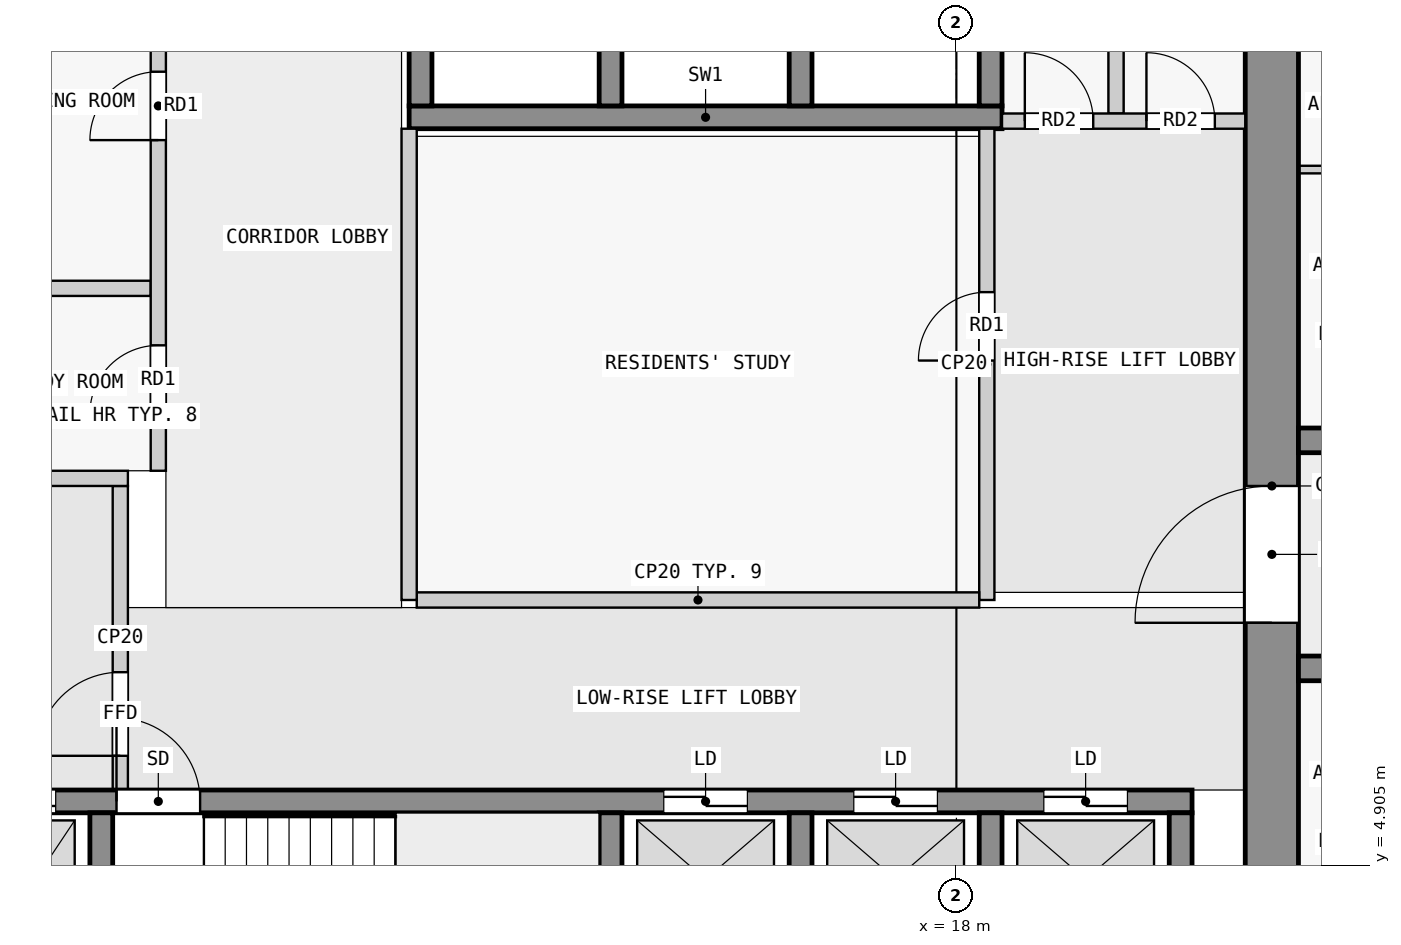
"""IFC4 building model, lengths in metres.
Left out: names, types, materials, properties, quantities, classifications, styles, units other than length and angle.
Written with IfcOpenShell. Run it as: python <this file> out.ifc"""

import sys

from ifc_helpers import new_model, si_unit, direction, frame, frame_2d, origin, place, context, subcontext, project, spatial, rectangle, extrude, element, fill, save


model = new_model("IFC4")
c1 = context("Model", 3, precision=1e-05, world=origin(), true_north=direction((0.0, 1.0)))
c2 = subcontext(c1, "Body", "Model", "MODEL_VIEW")
j1 = project(units=[si_unit("LENGTHUNIT", "METRE"), si_unit("PLANEANGLEUNIT", "RADIAN")], contexts=[c1])
p1 = place(None, origin())
s1 = spatial("IfcSite", under=j1, at=p1, CompositionType="ELEMENT")
p2 = place(p1, origin())
s2 = spatial("IfcBuilding", under=s1, at=p2, CompositionType="ELEMENT")
p3 = place(p2, frame((0.0, 0.0, 78.3)))
s3 = spatial("IfcBuildingStorey", under=s2, at=p3, CompositionType="ELEMENT", Elevation=78.3)
p4 = place(p3, frame((22.15, 2.5, 0.0), z_axis=(0.0, 0.0, 1.0), x_axis=(0.0, 1.0, 0.0)))
e1 = element("IfcWall", 1, at=p4, inside=s3, PredefinedType="SHEAR", context=c2, shape_type="SweptSolid", body=[
    extrude(rectangle(XDim=14.8, YDim=0.7, at=frame_2d((7.4, 0.0))), origin(), (0.0, 0.0, 1.0), 3.25),
])
p5 = place(p4, frame((5.6, 0.0, 0.0)))
e2 = element("IfcOpeningElement", 2, at=p5, cuts=e1, PredefinedType="OPENING", context=c2, shape_type="SweptSolid", body=[
    extrude(rectangle(XDim=1.8, YDim=2.1, at=frame_2d((0.9, 1.05))), frame((0.0, 0.36, 0.0), z_axis=(0.0, -1.0, 0.0), x_axis=(1.0, 0.0, 0.0)), (0.0, 0.0, 1.0), 0.72),
])
for number, where, z_axis, x_axis in (
    (3, (6.75, 2.8, 0.0), (0.0, 0.0, 1.0), (0.0, 1.0, 0.0)),
    (4, (13.45, 2.8, 0.0), (0.0, 0.0, 1.0), (0.0, 1.0, 0.0)),
    (5, (15.95, 2.8, 0.0), (0.0, 0.0, 1.0), (0.0, 1.0, 0.0)),
    (6, (18.45, 2.8, 0.0), (0.0, 0.0, 1.0), (0.0, 1.0, 0.0)),
    (7, (20.95, 2.8, 0.0), (0.0, 0.0, 1.0), (0.0, 1.0, 0.0)),
):
    element("IfcWall", number, at=place(p3, frame(where, z_axis=z_axis, x_axis=x_axis)), inside=s3, PredefinedType="SHEAR", context=c2, shape_type="SweptSolid", body=[
        extrude(rectangle(XDim=2.8, YDim=0.3, at=frame_2d((1.4, 0.0))), origin(), (0.0, 0.0, 1.0), 3.25),
    ])
p6 = place(p3, frame((2.3, 5.75, 0.0), z_axis=(0.0, 0.0, 1.0), x_axis=(1.0, 0.0, 0.0)))
e8 = element("IfcWall", 8, at=p6, inside=s3, PredefinedType="SHEAR", context=c2, shape_type="SweptSolid", body=[
    extrude(rectangle(XDim=18.8, YDim=0.3, at=frame_2d((9.4, 0.0))), origin(), (0.0, 0.0, 1.0), 3.25),
])
p7 = place(p6, frame((4.65, 0.0, 0.0)))
e9 = element("IfcOpeningElement", 9, at=p7, cuts=e8, PredefinedType="OPENING", context=c2, shape_type="SweptSolid", body=[
    extrude(rectangle(XDim=1.1, YDim=2.1, at=frame_2d((0.55, 1.05))), frame((0.0, 0.16, 0.0), z_axis=(0.0, -1.0, 0.0), x_axis=(1.0, 0.0, 0.0)), (0.0, 0.0, 1.0), 0.32),
])
p8 = place(p6, frame((0.45, 0.0, 0.0)))
e10 = element("IfcOpeningElement", 10, at=p8, cuts=e8, PredefinedType="OPENING", context=c2, shape_type="SweptSolid", body=[
    extrude(rectangle(XDim=1.1, YDim=2.1, at=frame_2d((0.55, 1.05))), frame((0.0, 0.16, 0.0), z_axis=(0.0, -1.0, 0.0), x_axis=(1.0, 0.0, 0.0)), (0.0, 0.0, 1.0), 0.32),
])
p9 = place(p6, frame((2.75, 0.0, 0.0)))
e11 = element("IfcOpeningElement", 11, at=p9, cuts=e8, PredefinedType="OPENING", context=c2, shape_type="SweptSolid", body=[
    extrude(rectangle(XDim=1.1, YDim=2.1, at=frame_2d((0.55, 1.05))), frame((0.0, 0.16, 0.0), z_axis=(0.0, -1.0, 0.0), x_axis=(1.0, 0.0, 0.0)), (0.0, 0.0, 1.0), 0.32),
])
p10 = place(p6, frame((11.85, 0.0, 0.0)))
e12 = element("IfcOpeningElement", 12, at=p10, cuts=e8, PredefinedType="OPENING", context=c2, shape_type="SweptSolid", body=[
    extrude(rectangle(XDim=1.1, YDim=2.1, at=frame_2d((0.55, 1.05))), frame((0.0, 0.16, 0.0), z_axis=(0.0, -1.0, 0.0), x_axis=(1.0, 0.0, 0.0)), (0.0, 0.0, 1.0), 0.32),
])
p11 = place(p6, frame((14.35, 0.0, 0.0)))
e13 = element("IfcOpeningElement", 13, at=p11, cuts=e8, PredefinedType="OPENING", context=c2, shape_type="SweptSolid", body=[
    extrude(rectangle(XDim=1.1, YDim=2.1, at=frame_2d((0.55, 1.05))), frame((0.0, 0.16, 0.0), z_axis=(0.0, -1.0, 0.0), x_axis=(1.0, 0.0, 0.0)), (0.0, 0.0, 1.0), 0.32),
])
p12 = place(p6, frame((16.85, 0.0, 0.0)))
e14 = element("IfcOpeningElement", 14, at=p12, cuts=e8, PredefinedType="OPENING", context=c2, shape_type="SweptSolid", body=[
    extrude(rectangle(XDim=1.1, YDim=2.1, at=frame_2d((0.55, 1.05))), frame((0.0, 0.16, 0.0), z_axis=(0.0, -1.0, 0.0), x_axis=(1.0, 0.0, 0.0)), (0.0, 0.0, 1.0), 0.32),
])
p13 = place(p3, frame((10.8, 14.75, 0.0), z_axis=(0.0, 0.0, 1.0), x_axis=(1.0, 0.0, 0.0)))
e15 = element("IfcWall", 15, at=p13, inside=s3, PredefinedType="SHEAR", context=c2, shape_type="SweptSolid", body=[
    extrude(rectangle(XDim=7.8, YDim=0.3, at=frame_2d((3.9, 0.0))), origin(), (0.0, 0.0, 1.0), 3.25),
])
for number, where, z_axis, x_axis in (
    (16, (10.95, 14.9, 0.0), (0.0, 0.0, 1.0), (0.0, 1.0, 0.0)),
    (17, (13.45, 14.9, 0.0), (0.0, 0.0, 1.0), (0.0, 1.0, 0.0)),
    (18, (15.95, 14.9, 0.0), (0.0, 0.0, 1.0), (0.0, 1.0, 0.0)),
    (19, (18.45, 14.9, 0.0), (0.0, 0.0, 1.0), (0.0, 1.0, 0.0)),
):
    element("IfcWall", number, at=place(p3, frame(where, z_axis=z_axis, x_axis=x_axis)), inside=s3, PredefinedType="SHEAR", context=c2, shape_type="SweptSolid", body=[
        extrude(rectangle(XDim=2.0, YDim=0.3, at=frame_2d((1.0, 0.0))), origin(), (0.0, 0.0, 1.0), 3.25),
    ])
p14 = place(p3, frame((22.5, 7.5, 0.0), z_axis=(0.0, 0.0, 1.0), x_axis=(1.0, 0.0, 0.0)))
e20 = element("IfcWall", 20, at=p14, inside=s3, PredefinedType="SHEAR", context=c2, shape_type="SweptSolid", body=[
    extrude(rectangle(XDim=22.5, YDim=0.325, at=frame_2d((11.25, 0.0))), origin(), (0.0, 0.0, 1.0), 3.25),
])
p15 = place(p14, frame((4.05, 0.0, 0.0)))
e21 = element("IfcOpeningElement", 21, at=p15, cuts=e20, PredefinedType="OPENING", context=c2, shape_type="SweptSolid", body=[
    extrude(rectangle(XDim=1.0, YDim=2.1, at=frame_2d((0.5, 1.05))), frame((0.0, 0.172, 0.0), z_axis=(0.0, -1.0, 0.0), x_axis=(1.0, 0.0, 0.0)), (0.0, 0.0, 1.0), 0.345),
])
p16 = place(p14, frame((13.05, 0.0, 0.0)))
e22 = element("IfcOpeningElement", 22, at=p16, cuts=e20, PredefinedType="OPENING", context=c2, shape_type="SweptSolid", body=[
    extrude(rectangle(XDim=1.0, YDim=2.1, at=frame_2d((0.5, 1.05))), frame((0.0, 0.172, 0.0), z_axis=(0.0, -1.0, 0.0), x_axis=(1.0, 0.0, 0.0)), (0.0, 0.0, 1.0), 0.345),
])
p17 = place(p14, frame((18.75, 0.0, 0.0)))
e23 = element("IfcOpeningElement", 23, at=p17, cuts=e20, PredefinedType="OPENING", context=c2, shape_type="SweptSolid", body=[
    extrude(rectangle(XDim=0.9, YDim=2.1, at=frame_2d((0.45, 1.05))), frame((0.0, 0.172, 0.0), z_axis=(0.0, -1.0, 0.0), x_axis=(1.0, 0.0, 0.0)), (0.0, 0.0, 1.0), 0.345),
])
p18 = place(p14, frame((20.95, 0.0, 0.0)))
e24 = element("IfcOpeningElement", 24, at=p18, cuts=e20, PredefinedType="OPENING", context=c2, shape_type="SweptSolid", body=[
    extrude(rectangle(XDim=1.0, YDim=2.1, at=frame_2d((0.5, 1.05))), frame((0.0, 0.172, 0.0), z_axis=(0.0, -1.0, 0.0), x_axis=(1.0, 0.0, 0.0)), (0.0, 0.0, 1.0), 0.345),
])
p19 = place(p3, frame((22.5, 10.5, 0.0), z_axis=(0.0, 0.0, 1.0), x_axis=(1.0, 0.0, 0.0)))
e25 = element("IfcWall", 25, at=p19, inside=s3, PredefinedType="SHEAR", context=c2, shape_type="SweptSolid", body=[
    extrude(rectangle(XDim=22.5, YDim=0.325, at=frame_2d((11.25, 0.0))), origin(), (0.0, 0.0, 1.0), 3.25),
])
p20 = place(p19, frame((4.05, 0.0, 0.0)))
e26 = element("IfcOpeningElement", 26, at=p20, cuts=e25, PredefinedType="OPENING", context=c2, shape_type="SweptSolid", body=[
    extrude(rectangle(XDim=1.0, YDim=2.1, at=frame_2d((0.5, 1.05))), frame((0.0, 0.172, 0.0), z_axis=(0.0, -1.0, 0.0), x_axis=(1.0, 0.0, 0.0)), (0.0, 0.0, 1.0), 0.345),
])
p21 = place(p19, frame((10.75, 0.0, 0.0)))
e27 = element("IfcOpeningElement", 27, at=p21, cuts=e25, PredefinedType="OPENING", context=c2, shape_type="SweptSolid", body=[
    extrude(rectangle(XDim=1.0, YDim=2.1, at=frame_2d((0.5, 1.05))), frame((0.0, 0.172, 0.0), z_axis=(0.0, -1.0, 0.0), x_axis=(1.0, 0.0, 0.0)), (0.0, 0.0, 1.0), 0.345),
])
p22 = place(p19, frame((16.85, 0.0, 0.0)))
e28 = element("IfcOpeningElement", 28, at=p22, cuts=e25, PredefinedType="OPENING", context=c2, shape_type="SweptSolid", body=[
    extrude(rectangle(XDim=1.0, YDim=2.1, at=frame_2d((0.5, 1.05))), frame((0.0, 0.172, 0.0), z_axis=(0.0, -1.0, 0.0), x_axis=(1.0, 0.0, 0.0)), (0.0, 0.0, 1.0), 0.345),
])
p23 = place(p3, frame((7.0, 5.9, 0.0), z_axis=(0.0, 0.0, 1.0), x_axis=(0.0, 1.0, 0.0)))
e29 = element("IfcWall", 29, at=p23, inside=s3, PredefinedType="PARTITIONING", context=c2, shape_type="SweptSolid", body=[
    extrude(rectangle(XDim=4.0, YDim=0.2, at=frame_2d((2.0, 0.0))), origin(), (0.0, 0.0, 1.0), 3.25),
])
p24 = place(p23, frame((0.45, 0.0, 0.0)))
e30 = element("IfcOpeningElement", 30, at=p24, cuts=e29, PredefinedType="OPENING", context=c2, shape_type="SweptSolid", body=[
    extrude(rectangle(XDim=1.1, YDim=2.1, at=frame_2d((0.55, 1.05))), frame((0.0, 0.11, 0.0), z_axis=(0.0, -1.0, 0.0), x_axis=(1.0, 0.0, 0.0)), (0.0, 0.0, 1.0), 0.22),
])
p25 = place(p3, frame((5.15, 10.0, 0.0), z_axis=(0.0, 0.0, 1.0), x_axis=(1.0, 0.0, 0.0)))
e31 = element("IfcWall", 31, at=p25, inside=s3, PredefinedType="PARTITIONING", context=c2, shape_type="SweptSolid", body=[
    extrude(rectangle(XDim=1.95, YDim=0.2, at=frame_2d((0.975, 0.0))), origin(), (0.0, 0.0, 1.0), 3.25),
])
p26 = place(p3, frame((10.8, 8.4, 0.0), z_axis=(0.0, 0.0, 1.0), x_axis=(0.0, 1.0, 0.0)))
e32 = element("IfcWall", 32, at=p26, inside=s3, PredefinedType="PARTITIONING", context=c2, shape_type="SweptSolid", body=[
    extrude(rectangle(XDim=6.2, YDim=0.2, at=frame_2d((3.1, 0.0))), origin(), (0.0, 0.0, 1.0), 3.25),
])
p27 = place(p3, frame((10.9, 8.4, 0.0), z_axis=(0.0, 0.0, 1.0), x_axis=(1.0, 0.0, 0.0)))
e33 = element("IfcWall", 33, at=p27, inside=s3, PredefinedType="PARTITIONING", context=c2, shape_type="SweptSolid", body=[
    extrude(rectangle(XDim=7.4, YDim=0.2, at=frame_2d((3.7, 0.0))), origin(), (0.0, 0.0, 1.0), 3.25),
])
p28 = place(p3, frame((18.4, 8.4, 0.0), z_axis=(0.0, 0.0, 1.0), x_axis=(0.0, 1.0, 0.0)))
e34 = element("IfcWall", 34, at=p28, inside=s3, PredefinedType="PARTITIONING", context=c2, shape_type="SweptSolid", body=[
    extrude(rectangle(XDim=6.2, YDim=0.2, at=frame_2d((3.1, 0.0))), origin(), (0.0, 0.0, 1.0), 3.25),
])
p29 = place(p28, frame((3.15, 0.0, 0.0)))
e35 = element("IfcOpeningElement", 35, at=p29, cuts=e34, PredefinedType="OPENING", context=c2, shape_type="SweptSolid", body=[
    extrude(rectangle(XDim=0.9, YDim=2.1, at=frame_2d((0.45, 1.05))), frame((0.0, 0.11, 0.0), z_axis=(0.0, -1.0, 0.0), x_axis=(1.0, 0.0, 0.0)), (0.0, 0.0, 1.0), 0.22),
])
p30 = place(p3, frame((7.5, 10.1, 0.0), z_axis=(0.0, 0.0, 1.0), x_axis=(0.0, 1.0, 0.0)))
e36 = element("IfcWall", 36, at=p30, inside=s3, PredefinedType="PARTITIONING", context=c2, shape_type="SweptSolid", body=[
    extrude(rectangle(XDim=7.2, YDim=0.2, at=frame_2d((3.6, 0.0))), origin(), (0.0, 0.0, 1.0), 3.25),
])
p31 = place(p30, frame((0.75, 0.0, 0.0)))
e37 = element("IfcOpeningElement", 37, at=p31, cuts=e36, PredefinedType="OPENING", context=c2, shape_type="SweptSolid", body=[
    extrude(rectangle(XDim=0.9, YDim=2.1, at=frame_2d((0.45, 1.05))), frame((0.0, 0.11, 0.0), z_axis=(0.0, -1.0, 0.0), x_axis=(1.0, 0.0, 0.0)), (0.0, 0.0, 1.0), 0.22),
])
p32 = place(p30, frame((4.35, 0.0, 0.0)))
e38 = element("IfcOpeningElement", 38, at=p32, cuts=e36, PredefinedType="OPENING", context=c2, shape_type="SweptSolid", body=[
    extrude(rectangle(XDim=0.9, YDim=2.1, at=frame_2d((0.45, 1.05))), frame((0.0, 0.11, 0.0), z_axis=(0.0, -1.0, 0.0), x_axis=(1.0, 0.0, 0.0)), (0.0, 0.0, 1.0), 0.22),
])
p33 = place(p3, frame((5.15, 12.5, 0.0), z_axis=(0.0, 0.0, 1.0), x_axis=(1.0, 0.0, 0.0)))
e39 = element("IfcWall", 39, at=p33, inside=s3, PredefinedType="PARTITIONING", context=c2, shape_type="SweptSolid", body=[
    extrude(rectangle(XDim=2.25, YDim=0.2, at=frame_2d((1.125, 0.0))), origin(), (0.0, 0.0, 1.0), 3.25),
])
p34 = place(p3, frame((18.6, 14.7, 0.0), z_axis=(0.0, 0.0, 1.0), x_axis=(1.0, 0.0, 0.0)))
e40 = element("IfcWall", 40, at=p34, inside=s3, PredefinedType="PARTITIONING", context=c2, shape_type="SweptSolid", body=[
    extrude(rectangle(XDim=3.2, YDim=0.2, at=frame_2d((1.6, 0.0))), origin(), (0.0, 0.0, 1.0), 3.25),
])
p35 = place(p34, frame((0.3, 0.0, 0.0)))
e41 = element("IfcOpeningElement", 41, at=p35, cuts=e40, PredefinedType="OPENING", context=c2, shape_type="SweptSolid", body=[
    extrude(rectangle(XDim=0.9, YDim=2.1, at=frame_2d((0.45, 1.05))), frame((0.0, 0.11, 0.0), z_axis=(0.0, -1.0, 0.0), x_axis=(1.0, 0.0, 0.0)), (0.0, 0.0, 1.0), 0.22),
])
p36 = place(p34, frame((1.9, 0.0, 0.0)))
e42 = element("IfcOpeningElement", 42, at=p36, cuts=e40, PredefinedType="OPENING", context=c2, shape_type="SweptSolid", body=[
    extrude(rectangle(XDim=0.9, YDim=2.1, at=frame_2d((0.45, 1.05))), frame((0.0, 0.11, 0.0), z_axis=(0.0, -1.0, 0.0), x_axis=(1.0, 0.0, 0.0)), (0.0, 0.0, 1.0), 0.22),
])
p37 = place(p3, frame((20.1, 14.8, 0.0), z_axis=(0.0, 0.0, 1.0), x_axis=(0.0, 1.0, 0.0)))
e43 = element("IfcWall", 43, at=p37, inside=s3, PredefinedType="PARTITIONING", context=c2, shape_type="SweptSolid", body=[
    extrude(rectangle(XDim=2.5, YDim=0.2, at=frame_2d((1.25, 0.0))), origin(), (0.0, 0.0, 1.0), 3.25),
])
p38 = place(p3, frame((24.25, 14.062, 0.0), z_axis=(0.0, 0.0, 1.0), x_axis=(-1.0, 0.0, 0.0)))
e44 = element("IfcWall", 44, at=p38, inside=s3, PredefinedType="PARTITIONING", context=c2, shape_type="SweptSolid", body=[
    extrude(rectangle(XDim=1.75, YDim=0.1, at=frame_2d((0.875, 0.0))), origin(), (0.0, 0.0, 1.0), 3.25),
])
p39 = place(p24, origin())
e45 = element("IfcDoor", 45, at=p39, inside=s3, OperationType="SINGLE_SWING_LEFT", PredefinedType="DOOR", context=c2, shape_type="SweptSolid", body=[
    extrude(rectangle(XDim=1.1, YDim=2.1, at=frame_2d((0.55, 1.05))), frame((0.0, 0.025, 0.0), z_axis=(0.0, -1.0, 0.0), x_axis=(1.0, 0.0, 0.0)), (0.0, 0.0, 1.0), 0.05),
])
fill(e30, e45)
p40 = place(p29, origin())
e46 = element("IfcDoor", 46, at=p40, inside=s3, OperationType="SINGLE_SWING_LEFT", PredefinedType="DOOR", context=c2, shape_type="SweptSolid", body=[
    extrude(rectangle(XDim=0.9, YDim=2.1, at=frame_2d((0.45, 1.05))), frame((0.0, 0.025, 0.0), z_axis=(0.0, -1.0, 0.0), x_axis=(1.0, 0.0, 0.0)), (0.0, 0.0, 1.0), 0.05),
])
fill(e35, e46)
p41 = place(p7, origin())
e47 = element("IfcDoor", 47, at=p41, inside=s3, OperationType="SINGLE_SWING_LEFT", PredefinedType="DOOR", context=c2, shape_type="SweptSolid", body=[
    extrude(rectangle(XDim=1.1, YDim=2.1, at=frame_2d((0.55, 1.05))), frame((0.0, 0.025, 0.0), z_axis=(0.0, -1.0, 0.0), x_axis=(1.0, 0.0, 0.0)), (0.0, 0.0, 1.0), 0.05),
])
fill(e9, e47)
p42 = place(p9, origin())
e48 = element("IfcDoor", 48, at=p42, inside=s3, OperationType="DOUBLE_DOOR_SLIDING", PredefinedType="DOOR", context=c2, shape_type="SweptSolid", body=[
    extrude(rectangle(XDim=1.1, YDim=2.1, at=frame_2d((0.55, 1.05))), frame((0.0, 0.025, 0.0), z_axis=(0.0, -1.0, 0.0), x_axis=(1.0, 0.0, 0.0)), (0.0, 0.0, 1.0), 0.05),
])
fill(e11, e48)
p43 = place(p10, origin())
e49 = element("IfcDoor", 49, at=p43, inside=s3, OperationType="DOUBLE_DOOR_SLIDING", PredefinedType="DOOR", context=c2, shape_type="SweptSolid", body=[
    extrude(rectangle(XDim=1.1, YDim=2.1, at=frame_2d((0.55, 1.05))), frame((0.0, 0.025, 0.0), z_axis=(0.0, -1.0, 0.0), x_axis=(1.0, 0.0, 0.0)), (0.0, 0.0, 1.0), 0.05),
])
fill(e12, e49)
p44 = place(p11, origin())
e50 = element("IfcDoor", 50, at=p44, inside=s3, OperationType="DOUBLE_DOOR_SLIDING", PredefinedType="DOOR", context=c2, shape_type="SweptSolid", body=[
    extrude(rectangle(XDim=1.1, YDim=2.1, at=frame_2d((0.55, 1.05))), frame((0.0, 0.025, 0.0), z_axis=(0.0, -1.0, 0.0), x_axis=(1.0, 0.0, 0.0)), (0.0, 0.0, 1.0), 0.05),
])
fill(e13, e50)
p45 = place(p12, origin())
e51 = element("IfcDoor", 51, at=p45, inside=s3, OperationType="DOUBLE_DOOR_SLIDING", PredefinedType="DOOR", context=c2, shape_type="SweptSolid", body=[
    extrude(rectangle(XDim=1.1, YDim=2.1, at=frame_2d((0.55, 1.05))), frame((0.0, 0.025, 0.0), z_axis=(0.0, -1.0, 0.0), x_axis=(1.0, 0.0, 0.0)), (0.0, 0.0, 1.0), 0.05),
])
fill(e14, e51)
p46 = place(p5, origin())
e52 = element("IfcDoor", 52, at=p46, inside=s3, OperationType="DOUBLE_DOOR_SINGLE_SWING", PredefinedType="DOOR", context=c2, shape_type="SweptSolid", body=[
    extrude(rectangle(XDim=1.8, YDim=2.1, at=frame_2d((0.9, 1.05))), frame((0.0, 0.025, 0.0), z_axis=(0.0, -1.0, 0.0), x_axis=(1.0, 0.0, 0.0)), (0.0, 0.0, 1.0), 0.05),
])
fill(e2, e52)
p47 = place(p31, origin())
e53 = element("IfcDoor", 53, at=p47, inside=s3, OperationType="SINGLE_SWING_RIGHT", PredefinedType="DOOR", context=c2, shape_type="SweptSolid", body=[
    extrude(rectangle(XDim=0.9, YDim=2.1, at=frame_2d((0.45, 1.05))), frame((0.0, 0.025, 0.0), z_axis=(0.0, -1.0, 0.0), x_axis=(1.0, 0.0, 0.0)), (0.0, 0.0, 1.0), 0.05),
])
fill(e37, e53)
p48 = place(p32, origin())
e54 = element("IfcDoor", 54, at=p48, inside=s3, OperationType="SINGLE_SWING_RIGHT", PredefinedType="DOOR", context=c2, shape_type="SweptSolid", body=[
    extrude(rectangle(XDim=0.9, YDim=2.1, at=frame_2d((0.45, 1.05))), frame((0.0, 0.025, 0.0), z_axis=(0.0, -1.0, 0.0), x_axis=(1.0, 0.0, 0.0)), (0.0, 0.0, 1.0), 0.05),
])
fill(e38, e54)
p49 = place(p35, origin())
e55 = element("IfcDoor", 55, at=p49, inside=s3, OperationType="SINGLE_SWING_LEFT", PredefinedType="DOOR", context=c2, shape_type="SweptSolid", body=[
    extrude(rectangle(XDim=0.9, YDim=2.1, at=frame_2d((0.45, 1.05))), frame((0.0, 0.025, 0.0), z_axis=(0.0, -1.0, 0.0), x_axis=(1.0, 0.0, 0.0)), (0.0, 0.0, 1.0), 0.05),
])
fill(e41, e55)
p50 = place(p36, origin())
e56 = element("IfcDoor", 56, at=p50, inside=s3, OperationType="SINGLE_SWING_LEFT", PredefinedType="DOOR", context=c2, shape_type="SweptSolid", body=[
    extrude(rectangle(XDim=0.9, YDim=2.1, at=frame_2d((0.45, 1.05))), frame((0.0, 0.025, 0.0), z_axis=(0.0, -1.0, 0.0), x_axis=(1.0, 0.0, 0.0)), (0.0, 0.0, 1.0), 0.05),
])
fill(e42, e56)
save(model, sys.argv[1])
